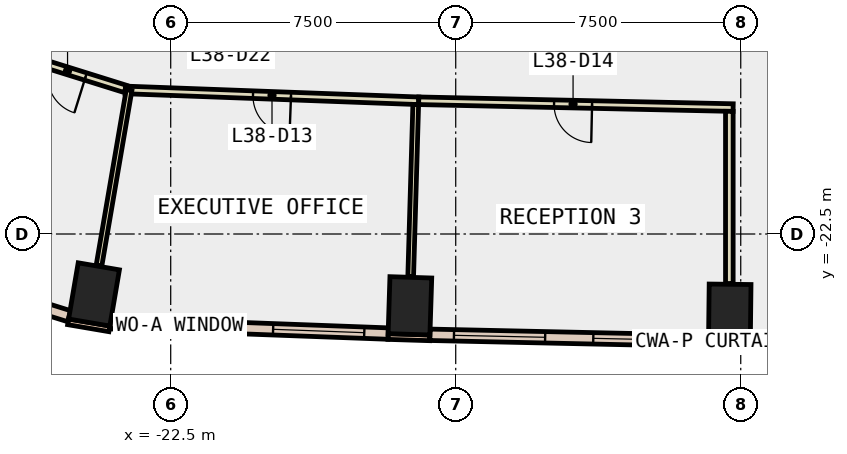
"""IFC4 building model, lengths in metres.
Left out: names, types, materials, properties, quantities, classifications, styles, units other than length and angle.
Written with IfcOpenShell. Run it as: python <this file> out.ifc"""

import sys

from ifc_helpers import new_model, si_unit, direction, frame, frame_2d, origin, origin_2d, place, context, subcontext, project, spatial, rectangle, extrude, element, fill, save


model = new_model("IFC4")
c1 = context("Model", 3, precision=1e-05, world=origin(), true_north=direction((0.0, 1.0)))
c2 = subcontext(c1, "Body", "Model", "MODEL_VIEW")
j1 = project(units=[si_unit("LENGTHUNIT", "METRE"), si_unit("PLANEANGLEUNIT", "RADIAN")], contexts=[c1])
p1 = place(None, origin())
s1 = spatial("IfcSite", under=j1, at=p1, CompositionType="ELEMENT")
p2 = place(p1, origin())
s2 = spatial("IfcBuilding", under=s1, at=p2, CompositionType="ELEMENT")
p3 = place(p2, frame((0.0, 0.0, 171.8)))
s3 = spatial("IfcBuildingStorey", under=s2, at=p3, CompositionType="ELEMENT", Elevation=171.8)
for number, where, z_axis, x_axis in (
    (1, (-24.518, -24.09, -0.4), (0.0, 0.0, 1.0), (-0.986, 0.168, 0.0)),
    (2, (-16.205, -24.39, -0.4), (0.0, 0.0, 1.0), (-0.999, 0.032, 0.0)),
    (3, (-7.789, -24.573, -0.4), (0.0, 0.0, 1.0), (-1.0, 0.012, 0.0)),
):
    element("IfcColumn", number, at=place(p3, frame(where, z_axis=z_axis, x_axis=x_axis)), inside=s3, PredefinedType="COLUMN", context=c2, shape_type="SweptSolid", body=[
        extrude(rectangle(XDim=1.1, YDim=1.5, at=origin_2d()), origin(), (0.0, 0.0, 1.0), 4.2),
    ])
p4 = place(p3, frame((-25.199, -24.811, 0.0), z_axis=(0.0, 0.0, 1.0), x_axis=(0.985763338892, -0.168138751323, 0.0)))
e4 = element("IfcWall", 4, at=p4, inside=s3, PredefinedType="STANDARD", context=c2, shape_type="SweptSolid", body=[
    extrude(rectangle(XDim=1.101, YDim=0.15, at=frame_2d((0.55, 0.0))), origin(), (0.0, 0.0, 1.0), 3.8),
])
p5 = place(p3, frame((-16.781, -25.198, 0.0), z_axis=(0.0, 0.0, 1.0), x_axis=(0.999523702549, -0.030860460829, 0.0)))
e5 = element("IfcWall", 5, at=p5, inside=s3, PredefinedType="STANDARD", context=c2, shape_type="SweptSolid", body=[
    extrude(rectangle(XDim=1.1, YDim=0.15, at=frame_2d((0.55, 0.0))), origin(), (0.0, 0.0, 1.0), 3.8),
])
p6 = place(p3, frame((-8.349, -25.392, 0.0), z_axis=(0.0, 0.0, 1.0), x_axis=(0.999940879068, -0.010873746799, 0.0)))
e6 = element("IfcWall", 6, at=p6, inside=s3, PredefinedType="STANDARD", context=c2, shape_type="SweptSolid", body=[
    extrude(rectangle(XDim=1.1, YDim=0.15, at=frame_2d((0.55, 0.0))), origin(), (0.0, 0.0, 1.0), 3.8),
])
p7 = place(p3, frame((-24.09, -24.848, 0.0), z_axis=(0.0, 0.0, 1.0), x_axis=(0.999307730926, -0.037202942236, 0.0)))
e7 = element("IfcWall", 7, at=p7, inside=s3, PredefinedType="STANDARD", context=c2, shape_type="SweptSolid", body=[
    extrude(rectangle(XDim=7.317, YDim=0.3, at=frame_2d((3.659, 0.0))), origin(), (0.0, 0.0, 1.0), 3.8),
])
p8 = place(p7, frame((0.629, 0.0, 0.9)))
e8 = element("IfcOpeningElement", 8, at=p8, cuts=e7, PredefinedType="OPENING", context=c2, shape_type="SweptSolid", body=[
    extrude(rectangle(XDim=2.4, YDim=2.6, at=frame_2d((1.2, 1.3))), frame((0.0, 0.16, 0.0), z_axis=(0.0, -1.0, 0.0), x_axis=(1.0, 0.0, 0.0)), (0.0, 0.0, 1.0), 0.32),
])
p9 = place(p7, frame((4.288, 0.0, 0.9)))
e9 = element("IfcOpeningElement", 9, at=p9, cuts=e7, PredefinedType="OPENING", context=c2, shape_type="SweptSolid", body=[
    extrude(rectangle(XDim=2.4, YDim=2.6, at=frame_2d((1.2, 1.3))), frame((0.0, 0.16, 0.0), z_axis=(0.0, -1.0, 0.0), x_axis=(1.0, 0.0, 0.0)), (0.0, 0.0, 1.0), 0.32),
])
p10 = place(p3, frame((-15.68, -25.152, 0.0), z_axis=(0.0, 0.0, 1.0), x_axis=(0.999765201774, -0.021668902196, 0.0)))
e10 = element("IfcWall", 10, at=p10, inside=s3, PredefinedType="STANDARD", context=c2, shape_type="SweptSolid", body=[
    extrude(rectangle(XDim=7.335, YDim=0.3, at=frame_2d((3.667, 0.0))), origin(), (0.0, 0.0, 1.0), 3.8),
])
p11 = place(p10, frame((0.634, 0.0, 0.9)))
e11 = element("IfcOpeningElement", 11, at=p11, cuts=e10, PredefinedType="OPENING", context=c2, shape_type="SweptSolid", body=[
    extrude(rectangle(XDim=2.4, YDim=2.6, at=frame_2d((1.2, 1.3))), frame((0.0, 0.16, 0.0), z_axis=(0.0, -1.0, 0.0), x_axis=(1.0, 0.0, 0.0)), (0.0, 0.0, 1.0), 0.32),
])
p12 = place(p10, frame((4.301, 0.0, 0.9)))
e12 = element("IfcOpeningElement", 12, at=p12, cuts=e10, PredefinedType="OPENING", context=c2, shape_type="SweptSolid", body=[
    extrude(rectangle(XDim=2.4, YDim=2.6, at=frame_2d((1.2, 1.3))), frame((0.0, 0.16, 0.0), z_axis=(0.0, -1.0, 0.0), x_axis=(1.0, 0.0, 0.0)), (0.0, 0.0, 1.0), 0.32),
])
p13 = place(p3, frame((-29.298, -23.376, 0.0), z_axis=(0.0, 0.0, 1.0), x_axis=(0.954628614874, -0.29779893832, 0.0)))
e13 = element("IfcWall", 13, at=p13, inside=s3, PredefinedType="STANDARD", context=c2, shape_type="SweptSolid", body=[
    extrude(rectangle(XDim=4.322, YDim=0.3, at=frame_2d((2.161, 0.0))), origin(), (0.0, 0.0, 1.0), 3.8),
])
p14 = place(p13, frame((1.461, 0.0, 0.9)))
e14 = element("IfcOpeningElement", 14, at=p14, cuts=e13, PredefinedType="OPENING", context=c2, shape_type="SweptSolid", body=[
    extrude(rectangle(XDim=1.4, YDim=2.6, at=frame_2d((0.7, 1.3))), frame((0.0, 0.16, 0.0), z_axis=(0.0, -1.0, 0.0), x_axis=(1.0, 0.0, 0.0)), (0.0, 0.0, 1.0), 0.32),
])
p15 = place(p3, frame((-23.691, -18.683, 0.0), z_axis=(0.0, 0.0, 1.0), x_axis=(-0.954546657381, 0.298061535398, 0.0)))
e15 = element("IfcWall", 15, at=p15, inside=s3, PredefinedType="PARTITIONING", context=c2, shape_type="SweptSolid", body=[
    extrude(rectangle(XDim=3.191, YDim=0.2, at=frame_2d((1.596, 0.0))), origin(), (0.0, 0.0, 1.0), 3.8),
])
p16 = place(p15, frame((1.096, 0.0, 0.0)))
e16 = element("IfcOpeningElement", 16, at=p16, cuts=e15, PredefinedType="OPENING", context=c2, shape_type="SweptSolid", body=[
    extrude(rectangle(XDim=1.0, YDim=2.1, at=frame_2d((0.5, 1.05))), frame((0.0, 0.11, 0.0), z_axis=(0.0, -1.0, 0.0), x_axis=(1.0, 0.0, 0.0)), (0.0, 0.0, 1.0), 0.22),
])
p17 = place(p3, frame((-15.974, -18.995, 0.0), z_axis=(0.0, 0.0, 1.0), x_axis=(-0.999314011084, 0.037033866276, 0.0)))
e17 = element("IfcWall", 17, at=p17, inside=s3, PredefinedType="PARTITIONING", context=c2, shape_type="SweptSolid", body=[
    extrude(rectangle(XDim=7.726, YDim=0.2, at=frame_2d((3.863, 0.0))), origin(), (0.0, 0.0, 1.0), 3.8),
])
p18 = place(p17, frame((3.363, 0.0, 0.0)))
e18 = element("IfcOpeningElement", 18, at=p18, cuts=e17, PredefinedType="OPENING", context=c2, shape_type="SweptSolid", body=[
    extrude(rectangle(XDim=1.0, YDim=2.1, at=frame_2d((0.5, 1.05))), frame((0.0, 0.11, 0.0), z_axis=(0.0, -1.0, 0.0), x_axis=(1.0, 0.0, 0.0)), (0.0, 0.0, 1.0), 0.22),
])
p19 = place(p3, frame((-7.7, -19.174, 0.0), z_axis=(0.0, 0.0, 1.0), x_axis=(-0.999762993889, 0.02177053169, 0.0)))
e19 = element("IfcWall", 19, at=p19, inside=s3, PredefinedType="PARTITIONING", context=c2, shape_type="SweptSolid", body=[
    extrude(rectangle(XDim=8.276, YDim=0.2, at=frame_2d((4.138, 0.0))), origin(), (0.0, 0.0, 1.0), 3.8),
])
p20 = place(p19, frame((3.713, 0.0, 0.0)))
e20 = element("IfcOpeningElement", 20, at=p20, cuts=e19, PredefinedType="OPENING", context=c2, shape_type="SweptSolid", body=[
    extrude(rectangle(XDim=1.0, YDim=2.1, at=frame_2d((0.5, 1.05))), frame((0.0, 0.11, 0.0), z_axis=(0.0, -1.0, 0.0), x_axis=(1.0, 0.0, 0.0)), (0.0, 0.0, 1.0), 0.22),
])
p21 = place(p3, frame((-7.8, -23.803, 0.0), z_axis=(0.0, 0.0, 1.0), x_axis=(0.0, 1.0, 0.0)))
e21 = element("IfcWall", 21, at=p21, inside=s3, PredefinedType="PARTITIONING", context=c2, shape_type="SweptSolid", body=[
    extrude(rectangle(XDim=4.531, YDim=0.2, at=frame_2d((2.266, 0.0))), origin(), (0.0, 0.0, 1.0), 3.8),
])
p22 = place(p3, frame((-23.595, -18.712, 0.0), z_axis=(0.0, 0.0, 1.0), x_axis=(-0.168992733164, -0.985617296996, 0.0)))
e22 = element("IfcWall", 22, at=p22, inside=s3, PredefinedType="PARTITIONING", context=c2, shape_type="SweptSolid", body=[
    extrude(rectangle(XDim=4.687, YDim=0.15, at=frame_2d((2.343, 0.0))), origin(), (0.0, 0.0, 1.0), 3.8),
])
p23 = place(p3, frame((-16.052, -19.092, 0.0), z_axis=(0.0, 0.0, 1.0), x_axis=(-0.029372127975, -0.999568545973, 0.0)))
e23 = element("IfcWall", 23, at=p23, inside=s3, PredefinedType="PARTITIONING", context=c2, shape_type="SweptSolid", body=[
    extrude(rectangle(XDim=4.53, YDim=0.15, at=frame_2d((2.265, 0.0))), origin(), (0.0, 0.0, 1.0), 3.8),
])
p24 = place(p8, origin())
e24 = element("IfcWindow", 24, at=p24, inside=s3, PartitioningType="SINGLE_PANEL", PredefinedType="WINDOW", context=c2, shape_type="SweptSolid", body=[
    extrude(rectangle(XDim=2.4, YDim=2.6, at=frame_2d((1.2, 1.3))), frame((0.0, 0.03, 0.0), z_axis=(0.0, -1.0, 0.0), x_axis=(1.0, 0.0, 0.0)), (0.0, 0.0, 1.0), 0.06),
])
fill(e8, e24)
p25 = place(p9, origin())
e25 = element("IfcWindow", 25, at=p25, inside=s3, PartitioningType="SINGLE_PANEL", PredefinedType="WINDOW", context=c2, shape_type="SweptSolid", body=[
    extrude(rectangle(XDim=2.4, YDim=2.6, at=frame_2d((1.2, 1.3))), frame((0.0, 0.03, 0.0), z_axis=(0.0, -1.0, 0.0), x_axis=(1.0, 0.0, 0.0)), (0.0, 0.0, 1.0), 0.06),
])
fill(e9, e25)
p26 = place(p11, origin())
e26 = element("IfcWindow", 26, at=p26, inside=s3, PartitioningType="SINGLE_PANEL", PredefinedType="WINDOW", context=c2, shape_type="SweptSolid", body=[
    extrude(rectangle(XDim=2.4, YDim=2.6, at=frame_2d((1.2, 1.3))), frame((0.0, 0.03, 0.0), z_axis=(0.0, -1.0, 0.0), x_axis=(1.0, 0.0, 0.0)), (0.0, 0.0, 1.0), 0.06),
])
fill(e11, e26)
p27 = place(p12, origin())
e27 = element("IfcWindow", 27, at=p27, inside=s3, PartitioningType="SINGLE_PANEL", PredefinedType="WINDOW", context=c2, shape_type="SweptSolid", body=[
    extrude(rectangle(XDim=2.4, YDim=2.6, at=frame_2d((1.2, 1.3))), frame((0.0, 0.03, 0.0), z_axis=(0.0, -1.0, 0.0), x_axis=(1.0, 0.0, 0.0)), (0.0, 0.0, 1.0), 0.06),
])
fill(e12, e27)
p28 = place(p16, origin())
e28 = element("IfcDoor", 28, at=p28, inside=s3, OperationType="SINGLE_SWING_LEFT", PredefinedType="DOOR", context=c2, shape_type="SweptSolid", body=[
    extrude(rectangle(XDim=1.0, YDim=2.1, at=frame_2d((0.5, 1.05))), frame((0.0, 0.025, 0.0), z_axis=(0.0, -1.0, 0.0), x_axis=(1.0, 0.0, 0.0)), (0.0, 0.0, 1.0), 0.05),
])
fill(e16, e28)
p29 = place(p18, origin())
e29 = element("IfcDoor", 29, at=p29, inside=s3, OperationType="SINGLE_SWING_LEFT", PredefinedType="DOOR", context=c2, shape_type="SweptSolid", body=[
    extrude(rectangle(XDim=1.0, YDim=2.1, at=frame_2d((0.5, 1.05))), frame((0.0, 0.025, 0.0), z_axis=(0.0, -1.0, 0.0), x_axis=(1.0, 0.0, 0.0)), (0.0, 0.0, 1.0), 0.05),
])
fill(e18, e29)
p30 = place(p20, origin())
e30 = element("IfcDoor", 30, at=p30, inside=s3, OperationType="SINGLE_SWING_RIGHT", PredefinedType="DOOR", context=c2, shape_type="SweptSolid", body=[
    extrude(rectangle(XDim=1.0, YDim=2.1, at=frame_2d((0.5, 1.05))), frame((0.0, 0.025, 0.0), z_axis=(0.0, -1.0, 0.0), x_axis=(1.0, 0.0, 0.0)), (0.0, 0.0, 1.0), 0.05),
])
fill(e20, e30)
save(model, sys.argv[1])
